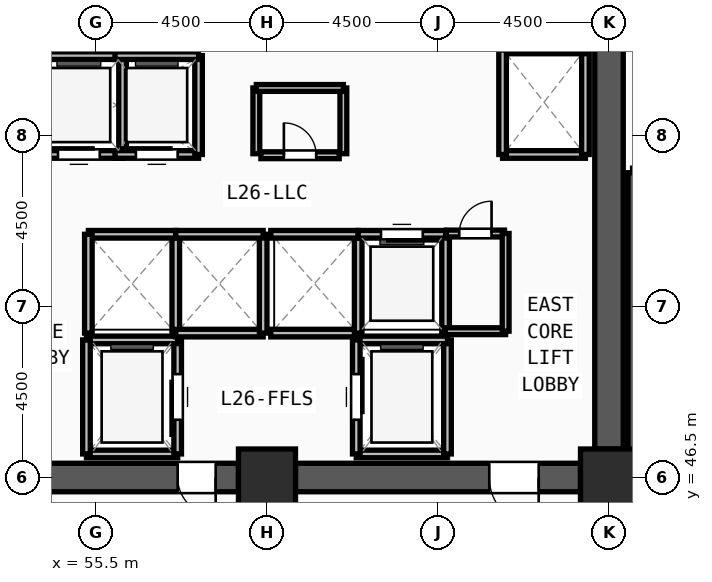
"""IFC4 building model, lengths in metres.
Left out: names, types, materials, properties, quantities, classifications, styles, units other than length and angle.
Written with IfcOpenShell. Run it as: python <this file> out.ifc"""

import sys

from ifc_helpers import new_model, si_unit, direction, frame, frame_2d, origin, origin_2d, place, context, subcontext, project, spatial, rectangle, extrude, source, transform, mapped, element, fill, save


model = new_model("IFC4")
c1 = context("Model", 3, precision=1e-05, world=origin(), true_north=direction((0.0, 1.0)))
c2 = subcontext(c1, "Body", "Model", "MODEL_VIEW")
j1 = project(units=[si_unit("LENGTHUNIT", "METRE"), si_unit("PLANEANGLEUNIT", "RADIAN")], contexts=[c1])
p1 = place(None, origin())
s1 = spatial("IfcSite", under=j1, at=p1, CompositionType="ELEMENT")
p2 = place(p1, origin())
s2 = spatial("IfcBuilding", under=s1, at=p2, CompositionType="ELEMENT")
p3 = place(p2, frame((0.0, 0.0, 102.0)))
s3 = spatial("IfcBuildingStorey", under=s2, at=p3, CompositionType="ELEMENT", Elevation=102.0)
m1 = source(origin(), c2, "Body", "SweptSolid", [
    extrude(rectangle(XDim=1.5, YDim=1.5, at=origin_2d()), origin(), (0.0, 0.0, 1.0), 3.75),
])
for number, where, z_axis, x_axis in (
    (1, (60.0, 46.5, 0.0), (0.0, 0.0, 1.0), (1.0, 0.0, 0.0)),
    (2, (69.0, 46.5, 0.0), (0.0, 0.0, 1.0), (1.0, 0.0, 0.0)),
):
    element("IfcColumn", number, at=place(p3, frame(where, z_axis=z_axis, x_axis=x_axis)), inside=s3, PredefinedType="COLUMN", context=c2, shape_type="MappedRepresentation", body=[
        mapped(m1, transform((0.0, 0.0, 0.0), x_axis=(1.0, 0.0, 0.0), y_axis=(0.0, 1.0, 0.0), z_axis=(0.0, 0.0, 1.0), scale=1.0)),
    ])
p4 = place(p3, frame((69.0, 60.75, 0.0), z_axis=(0.0, 0.0, 1.0), x_axis=(0.0, -1.0, 0.0)))
e3 = element("IfcWall", 3, at=p4, inside=s3, PredefinedType="SHEAR", context=c2, shape_type="SweptSolid", body=[
    extrude(rectangle(XDim=13.5, YDim=0.75, at=frame_2d((6.75, 0.0))), origin(), (0.0, 0.0, 1.0), 3.57),
])
m2 = source(origin(), c2, "Body", "SweptSolid", [
    extrude(rectangle(XDim=1.2, YDim=2.2, at=frame_2d((0.6, 1.1))), frame((0.0, 0.385, 0.0), z_axis=(0.0, -1.0, 0.0), x_axis=(1.0, 0.0, 0.0)), (0.0, 0.0, 1.0), 0.77),
])
p5 = place(p4, frame((1.2, 0.0, 0.0)))
e4 = element("IfcOpeningElement", 4, at=p5, cuts=e3, PredefinedType="OPENING", context=c2, shape_type="MappedRepresentation", body=[
    mapped(m2, transform((0.0, 0.0, 0.0), x_axis=(1.0, 0.0, 0.0), y_axis=(0.0, 1.0, 0.0), z_axis=(0.0, 0.0, 1.0), scale=1.0)),
])
p6 = place(p3, frame((68.25, 46.5, 0.0), z_axis=(0.0, 0.0, 1.0), x_axis=(-1.0, 0.0, 0.0)))
e5 = element("IfcWall", 5, at=p6, inside=s3, PredefinedType="SHEAR", context=c2, shape_type="SweptSolid", body=[
    extrude(rectangle(XDim=7.5, YDim=0.75, at=frame_2d((3.75, 0.0))), origin(), (0.0, 0.0, 1.0), 3.57),
])
m3 = source(origin(), c2, "Body", "SweptSolid", [
    extrude(rectangle(XDim=1.3, YDim=2.2, at=frame_2d((0.65, 1.1))), frame((0.0, 0.385, 0.0), z_axis=(0.0, -1.0, 0.0), x_axis=(1.0, 0.0, 0.0)), (0.0, 0.0, 1.0), 0.77),
])
p7 = place(p6, frame((1.1, 0.0, 0.0)))
e6 = element("IfcOpeningElement", 6, at=p7, cuts=e5, PredefinedType="OPENING", context=c2, shape_type="MappedRepresentation", body=[
    mapped(m3, transform((0.0, 0.0, 0.0), x_axis=(1.0, 0.0, 0.0), y_axis=(0.0, 1.0, 0.0), z_axis=(0.0, 0.0, 1.0), scale=1.0)),
])
p8 = place(p3, frame((59.25, 46.5, 0.0), z_axis=(0.0, 0.0, 1.0), x_axis=(-1.0, 0.0, 0.0)))
e7 = element("IfcWall", 7, at=p8, inside=s3, PredefinedType="SHEAR", context=c2, shape_type="SweptSolid", body=[
    extrude(rectangle(XDim=7.5, YDim=0.75, at=frame_2d((3.75, 0.0))), origin(), (0.0, 0.0, 1.0), 3.57),
])
p9 = place(p8, frame((5.1, 0.0, 0.0)))
e8 = element("IfcOpeningElement", 8, at=p9, cuts=e7, PredefinedType="OPENING", context=c2, shape_type="MappedRepresentation", body=[
    mapped(m3, transform((0.0, 0.0, 0.0), x_axis=(1.0, 0.0, 0.0), y_axis=(0.0, 1.0, 0.0), z_axis=(0.0, 0.0, 1.0), scale=1.0)),
])
m4 = source(origin(), c2, "Body", "SweptSolid", [
    extrude(rectangle(XDim=1.0, YDim=2.2, at=frame_2d((0.5, 1.1))), frame((0.0, 0.385, 0.0), z_axis=(0.0, -1.0, 0.0), x_axis=(1.0, 0.0, 0.0)), (0.0, 0.0, 1.0), 0.77),
])
p10 = place(p8, frame((0.6, 0.0, 0.0)))
e9 = element("IfcOpeningElement", 9, at=p10, cuts=e7, PredefinedType="OPENING", context=c2, shape_type="MappedRepresentation", body=[
    mapped(m4, transform((0.0, 0.0, 0.0), x_axis=(1.0, 0.0, 0.0), y_axis=(0.0, 1.0, 0.0), z_axis=(0.0, 0.0, 1.0), scale=1.0)),
])
p11 = place(p3, frame((69.62, 54.52, 0.0), z_axis=(0.0, 0.0, 1.0), x_axis=(0.0, -1.0, 0.0)))
e10 = element("IfcWall", 10, at=p11, inside=s3, PredefinedType="SOLIDWALL", context=c2, shape_type="SweptSolid", body=[
    extrude(rectangle(XDim=7.82, YDim=0.24, at=frame_2d((3.91, 0.0))), origin(), (0.0, 0.0, 1.0), 3.57),
])
p12 = place(p3, frame((55.25, 47.12, 0.0), z_axis=(0.0, 0.0, 1.0), x_axis=(1.0, 0.0, 0.0)))
e11 = element("IfcWall", 11, at=p12, inside=s3, PredefinedType="SOLIDWALL", context=c2, shape_type="SweptSolid", body=[
    extrude(rectangle(XDim=2.4, YDim=0.2, at=frame_2d((1.2, 0.0))), origin(), (0.0, 0.0, 1.0), 3.57),
])
p13 = place(p3, frame((57.65, 47.12, 0.0), z_axis=(0.0, 0.0, 1.0), x_axis=(0.0, 1.0, 0.0)))
e12 = element("IfcWall", 12, at=p13, inside=s3, PredefinedType="SOLIDWALL", context=c2, shape_type="SweptSolid", body=[
    extrude(rectangle(XDim=3.0, YDim=0.2, at=frame_2d((1.5, 0.0))), origin(), (0.0, 0.0, 1.0), 3.57),
])
m5 = source(origin(), c2, "Body", "SweptSolid", [
    extrude(rectangle(XDim=1.2, YDim=2.3, at=frame_2d((0.6, 1.15))), frame((0.0, 0.11, 0.0), z_axis=(0.0, -1.0, 0.0), x_axis=(1.0, 0.0, 0.0)), (0.0, 0.0, 1.0), 0.22),
])
p14 = place(p13, frame((0.9, 0.0, 0.0)))
e13 = element("IfcOpeningElement", 13, at=p14, cuts=e12, PredefinedType="OPENING", context=c2, shape_type="MappedRepresentation", body=[
    mapped(m5, transform((0.0, 0.0, 0.0), x_axis=(1.0, 0.0, 0.0), y_axis=(0.0, 1.0, 0.0), z_axis=(0.0, 0.0, 1.0), scale=1.0)),
])
p15 = place(p3, frame((57.65, 50.12, 0.0), z_axis=(0.0, 0.0, 1.0), x_axis=(-1.0, 0.0, 0.0)))
e14 = element("IfcWall", 14, at=p15, inside=s3, PredefinedType="SOLIDWALL", context=c2, shape_type="SweptSolid", body=[
    extrude(rectangle(XDim=2.4, YDim=0.2, at=frame_2d((1.2, 0.0))), origin(), (0.0, 0.0, 1.0), 3.57),
])
p16 = place(p3, frame((55.25, 50.12, 0.0), z_axis=(0.0, 0.0, 1.0), x_axis=(0.0, -1.0, 0.0)))
e15 = element("IfcWall", 15, at=p16, inside=s3, PredefinedType="SOLIDWALL", context=c2, shape_type="SweptSolid", body=[
    extrude(rectangle(XDim=3.0, YDim=0.2, at=frame_2d((1.5, 0.0))), origin(), (0.0, 0.0, 1.0), 3.57),
])
p17 = place(p3, frame((62.35, 47.12, 0.0), z_axis=(0.0, 0.0, 1.0), x_axis=(1.0, 0.0, 0.0)))
e16 = element("IfcWall", 16, at=p17, inside=s3, PredefinedType="SOLIDWALL", context=c2, shape_type="SweptSolid", body=[
    extrude(rectangle(XDim=2.4, YDim=0.2, at=frame_2d((1.2, 0.0))), origin(), (0.0, 0.0, 1.0), 3.57),
])
p18 = place(p3, frame((64.75, 47.12, 0.0), z_axis=(0.0, 0.0, 1.0), x_axis=(0.0, 1.0, 0.0)))
e17 = element("IfcWall", 17, at=p18, inside=s3, PredefinedType="SOLIDWALL", context=c2, shape_type="SweptSolid", body=[
    extrude(rectangle(XDim=3.0, YDim=0.2, at=frame_2d((1.5, 0.0))), origin(), (0.0, 0.0, 1.0), 3.57),
])
p19 = place(p3, frame((64.75, 50.12, 0.0), z_axis=(0.0, 0.0, 1.0), x_axis=(-1.0, 0.0, 0.0)))
e18 = element("IfcWall", 18, at=p19, inside=s3, PredefinedType="SOLIDWALL", context=c2, shape_type="SweptSolid", body=[
    extrude(rectangle(XDim=2.4, YDim=0.2, at=frame_2d((1.2, 0.0))), origin(), (0.0, 0.0, 1.0), 3.57),
])
p20 = place(p3, frame((62.35, 50.12, 0.0), z_axis=(0.0, 0.0, 1.0), x_axis=(0.0, -1.0, 0.0)))
e19 = element("IfcWall", 19, at=p20, inside=s3, PredefinedType="SOLIDWALL", context=c2, shape_type="SweptSolid", body=[
    extrude(rectangle(XDim=3.0, YDim=0.2, at=frame_2d((1.5, 0.0))), origin(), (0.0, 0.0, 1.0), 3.57),
])
p21 = place(p20, frame((0.9, 0.0, 0.0)))
e20 = element("IfcOpeningElement", 20, at=p21, cuts=e19, PredefinedType="OPENING", context=c2, shape_type="MappedRepresentation", body=[
    mapped(m5, transform((0.0, 0.0, 0.0), x_axis=(1.0, 0.0, 0.0), y_axis=(0.0, 1.0, 0.0), z_axis=(0.0, 0.0, 1.0), scale=1.0)),
])
p22 = place(p3, frame((66.2, 55.0, 0.0), z_axis=(0.0, 0.0, 1.0), x_axis=(1.0, 0.0, 0.0)))
e21 = element("IfcWall", 21, at=p22, inside=s3, PredefinedType="SOLIDWALL", context=c2, shape_type="SweptSolid", body=[
    extrude(rectangle(XDim=2.18, YDim=0.2, at=frame_2d((1.09, 0.0))), origin(), (0.0, 0.0, 1.0), 3.57),
])
p23 = place(p3, frame((68.38, 55.0, 0.0), z_axis=(0.0, 0.0, 1.0), x_axis=(0.0, 1.0, 0.0)))
e22 = element("IfcWall", 22, at=p23, inside=s3, PredefinedType="SOLIDWALL", context=c2, shape_type="SweptSolid", body=[
    extrude(rectangle(XDim=2.75, YDim=0.2, at=frame_2d((1.375, 0.0))), origin(), (0.0, 0.0, 1.0), 3.57),
])
p24 = place(p3, frame((68.38, 57.75, 0.0), z_axis=(0.0, 0.0, 1.0), x_axis=(-1.0, 0.0, 0.0)))
e23 = element("IfcWall", 23, at=p24, inside=s3, PredefinedType="SOLIDWALL", context=c2, shape_type="SweptSolid", body=[
    extrude(rectangle(XDim=2.18, YDim=0.2, at=frame_2d((1.09, 0.0))), origin(), (0.0, 0.0, 1.0), 3.57),
])
p25 = place(p3, frame((66.2, 57.75, 0.0), z_axis=(0.0, 0.0, 1.0), x_axis=(0.0, -1.0, 0.0)))
e24 = element("IfcWall", 24, at=p25, inside=s3, PredefinedType="SOLIDWALL", context=c2, shape_type="SweptSolid", body=[
    extrude(rectangle(XDim=2.75, YDim=0.2, at=frame_2d((1.375, 0.0))), origin(), (0.0, 0.0, 1.0), 3.57),
])
p26 = place(p3, frame((57.6, 50.3, 0.0), z_axis=(0.0, 0.0, 1.0), x_axis=(0.0, 1.0, 0.0)))
e25 = element("IfcWall", 25, at=p26, inside=s3, PredefinedType="SOLIDWALL", context=c2, shape_type="SweptSolid", body=[
    extrude(rectangle(XDim=2.6, YDim=0.2, at=frame_2d((1.3, 0.0))), origin(), (0.0, 0.0, 1.0), 3.57),
])
p27 = place(p3, frame((57.6, 52.9, 0.0), z_axis=(0.0, 0.0, 1.0), x_axis=(-1.0, 0.0, 0.0)))
e26 = element("IfcWall", 26, at=p27, inside=s3, PredefinedType="SOLIDWALL", context=c2, shape_type="SweptSolid", body=[
    extrude(rectangle(XDim=2.3, YDim=0.2, at=frame_2d((1.15, 0.0))), origin(), (0.0, 0.0, 1.0), 3.57),
])
p28 = place(p3, frame((55.3, 52.9, 0.0), z_axis=(0.0, 0.0, 1.0), x_axis=(0.0, -1.0, 0.0)))
e27 = element("IfcWall", 27, at=p28, inside=s3, PredefinedType="SOLIDWALL", context=c2, shape_type="SweptSolid", body=[
    extrude(rectangle(XDim=2.6, YDim=0.2, at=frame_2d((1.3, 0.0))), origin(), (0.0, 0.0, 1.0), 3.57),
])
p29 = place(p3, frame((57.6, 50.3, 0.0), z_axis=(0.0, 0.0, 1.0), x_axis=(1.0, 0.0, 0.0)))
e28 = element("IfcWall", 28, at=p29, inside=s3, PredefinedType="SOLIDWALL", context=c2, shape_type="SweptSolid", body=[
    extrude(rectangle(XDim=2.3, YDim=0.2, at=frame_2d((1.15, 0.0))), origin(), (0.0, 0.0, 1.0), 3.57),
])
p30 = place(p3, frame((59.9, 50.3, 0.0), z_axis=(0.0, 0.0, 1.0), x_axis=(0.0, 1.0, 0.0)))
e29 = element("IfcWall", 29, at=p30, inside=s3, PredefinedType="SOLIDWALL", context=c2, shape_type="SweptSolid", body=[
    extrude(rectangle(XDim=2.6, YDim=0.2, at=frame_2d((1.3, 0.0))), origin(), (0.0, 0.0, 1.0), 3.57),
])
for number, where, z_axis, x_axis in (
    (30, (59.9, 52.9, 0.0), (0.0, 0.0, 1.0), (-1.0, 0.0, 0.0)),
    (31, (60.1, 50.3, 0.0), (0.0, 0.0, 1.0), (1.0, 0.0, 0.0)),
):
    element("IfcWall", number, at=place(p3, frame(where, z_axis=z_axis, x_axis=x_axis)), inside=s3, PredefinedType="SOLIDWALL", context=c2, shape_type="SweptSolid", body=[
        extrude(rectangle(XDim=2.3, YDim=0.2, at=frame_2d((1.15, 0.0))), origin(), (0.0, 0.0, 1.0), 3.57),
    ])
p31 = place(p3, frame((62.4, 50.3, 0.0), z_axis=(0.0, 0.0, 1.0), x_axis=(0.0, 1.0, 0.0)))
e32 = element("IfcWall", 32, at=p31, inside=s3, PredefinedType="SOLIDWALL", context=c2, shape_type="SweptSolid", body=[
    extrude(rectangle(XDim=2.6, YDim=0.2, at=frame_2d((1.3, 0.0))), origin(), (0.0, 0.0, 1.0), 3.57),
])
p32 = place(p3, frame((62.4, 52.9, 0.0), z_axis=(0.0, 0.0, 1.0), x_axis=(-1.0, 0.0, 0.0)))
e33 = element("IfcWall", 33, at=p32, inside=s3, PredefinedType="SOLIDWALL", context=c2, shape_type="SweptSolid", body=[
    extrude(rectangle(XDim=2.3, YDim=0.2, at=frame_2d((1.15, 0.0))), origin(), (0.0, 0.0, 1.0), 3.57),
])
p33 = place(p3, frame((64.7, 50.3, 0.0), z_axis=(0.0, 0.0, 1.0), x_axis=(0.0, 1.0, 0.0)))
e34 = element("IfcWall", 34, at=p33, inside=s3, PredefinedType="SOLIDWALL", context=c2, shape_type="SweptSolid", body=[
    extrude(rectangle(XDim=2.6, YDim=0.2, at=frame_2d((1.3, 0.0))), origin(), (0.0, 0.0, 1.0), 3.57),
])
p34 = place(p3, frame((64.7, 52.9, 0.0), z_axis=(0.0, 0.0, 1.0), x_axis=(-1.0, 0.0, 0.0)))
e35 = element("IfcWall", 35, at=p34, inside=s3, PredefinedType="SOLIDWALL", context=c2, shape_type="SweptSolid", body=[
    extrude(rectangle(XDim=2.3, YDim=0.2, at=frame_2d((1.15, 0.0))), origin(), (0.0, 0.0, 1.0), 3.57),
])
m6 = source(origin(), c2, "Body", "SweptSolid", [
    extrude(rectangle(XDim=1.1, YDim=2.2, at=frame_2d((0.55, 1.1))), frame((0.0, 0.11, 0.0), z_axis=(0.0, -1.0, 0.0), x_axis=(1.0, 0.0, 0.0)), (0.0, 0.0, 1.0), 0.22),
])
p35 = place(p34, frame((0.6, 0.0, 0.0)))
e36 = element("IfcOpeningElement", 36, at=p35, cuts=e35, PredefinedType="OPENING", context=c2, shape_type="MappedRepresentation", body=[
    mapped(m6, transform((0.0, 0.0, 0.0), x_axis=(1.0, 0.0, 0.0), y_axis=(0.0, 1.0, 0.0), z_axis=(0.0, 0.0, 1.0), scale=1.0)),
])
p36 = place(p3, frame((53.9, 55.0, 0.0), z_axis=(0.0, 0.0, 1.0), x_axis=(1.0, 0.0, 0.0)))
e37 = element("IfcWall", 37, at=p36, inside=s3, PredefinedType="SOLIDWALL", context=c2, shape_type="SweptSolid", body=[
    extrude(rectangle(XDim=2.3, YDim=0.2, at=frame_2d((1.15, 0.0))), origin(), (0.0, 0.0, 1.0), 3.57),
])
p37 = place(p36, frame((0.6, 0.0, 0.0)))
e38 = element("IfcOpeningElement", 38, at=p37, cuts=e37, PredefinedType="OPENING", context=c2, shape_type="MappedRepresentation", body=[
    mapped(m6, transform((0.0, 0.0, 0.0), x_axis=(1.0, 0.0, 0.0), y_axis=(0.0, 1.0, 0.0), z_axis=(0.0, 0.0, 1.0), scale=1.0)),
])
p38 = place(p3, frame((56.2, 55.0, 0.0), z_axis=(0.0, 0.0, 1.0), x_axis=(0.0, 1.0, 0.0)))
e39 = element("IfcWall", 39, at=p38, inside=s3, PredefinedType="SOLIDWALL", context=c2, shape_type="SweptSolid", body=[
    extrude(rectangle(XDim=2.6, YDim=0.2, at=frame_2d((1.3, 0.0))), origin(), (0.0, 0.0, 1.0), 3.57),
])
p39 = place(p3, frame((56.2, 57.6, 0.0), z_axis=(0.0, 0.0, 1.0), x_axis=(-1.0, 0.0, 0.0)))
e40 = element("IfcWall", 40, at=p39, inside=s3, PredefinedType="SOLIDWALL", context=c2, shape_type="SweptSolid", body=[
    extrude(rectangle(XDim=2.3, YDim=0.2, at=frame_2d((1.15, 0.0))), origin(), (0.0, 0.0, 1.0), 3.57),
])
p40 = place(p3, frame((56.0, 55.0, 0.0), z_axis=(0.0, 0.0, 1.0), x_axis=(1.0, 0.0, 0.0)))
e41 = element("IfcWall", 41, at=p40, inside=s3, PredefinedType="SOLIDWALL", context=c2, shape_type="SweptSolid", body=[
    extrude(rectangle(XDim=2.2, YDim=0.2, at=frame_2d((1.1, 0.0))), origin(), (0.0, 0.0, 1.0), 3.57),
])
p41 = place(p40, frame((0.55, 0.0, 0.0)))
e42 = element("IfcOpeningElement", 42, at=p41, cuts=e41, PredefinedType="OPENING", context=c2, shape_type="MappedRepresentation", body=[
    mapped(m6, transform((0.0, 0.0, 0.0), x_axis=(1.0, 0.0, 0.0), y_axis=(0.0, 1.0, 0.0), z_axis=(0.0, 0.0, 1.0), scale=1.0)),
])
p42 = place(p3, frame((58.2, 55.0, 0.0), z_axis=(0.0, 0.0, 1.0), x_axis=(0.0, 1.0, 0.0)))
e43 = element("IfcWall", 43, at=p42, inside=s3, PredefinedType="SOLIDWALL", context=c2, shape_type="SweptSolid", body=[
    extrude(rectangle(XDim=2.6, YDim=0.2, at=frame_2d((1.3, 0.0))), origin(), (0.0, 0.0, 1.0), 3.57),
])
p43 = place(p3, frame((58.2, 57.6, 0.0), z_axis=(0.0, 0.0, 1.0), x_axis=(-1.0, 0.0, 0.0)))
e44 = element("IfcWall", 44, at=p43, inside=s3, PredefinedType="SOLIDWALL", context=c2, shape_type="SweptSolid", body=[
    extrude(rectangle(XDim=2.2, YDim=0.2, at=frame_2d((1.1, 0.0))), origin(), (0.0, 0.0, 1.0), 3.57),
])
p44 = place(p3, frame((59.84, 54.98, 0.0), z_axis=(0.0, 0.0, 1.0), x_axis=(1.0, 0.0, 0.0)))
e45 = element("IfcWall", 45, at=p44, inside=s3, PredefinedType="PARTITIONING", context=c2, shape_type="SweptSolid", body=[
    extrude(rectangle(XDim=2.06, YDim=0.18, at=frame_2d((1.03, 0.0))), origin(), (0.0, 0.0, 1.0), 3.57),
])
m7 = source(origin(), c2, "Body", "SweptSolid", [
    extrude(rectangle(XDim=0.85, YDim=2.1, at=frame_2d((0.425, 1.05))), frame((0.0, 0.1, 0.0), z_axis=(0.0, -1.0, 0.0), x_axis=(1.0, 0.0, 0.0)), (0.0, 0.0, 1.0), 0.2),
])
p45 = place(p44, frame((0.605, 0.0, 0.0)))
e46 = element("IfcOpeningElement", 46, at=p45, cuts=e45, PredefinedType="OPENING", context=c2, shape_type="MappedRepresentation", body=[
    mapped(m7, transform((0.0, 0.0, 0.0), x_axis=(1.0, 0.0, 0.0), y_axis=(0.0, 1.0, 0.0), z_axis=(0.0, 0.0, 1.0), scale=1.0)),
])
p46 = place(p3, frame((64.72, 52.92, 0.0), z_axis=(0.0, 0.0, 1.0), x_axis=(1.0, 0.0, 0.0)))
e47 = element("IfcWall", 47, at=p46, inside=s3, PredefinedType="PARTITIONING", context=c2, shape_type="SweptSolid", body=[
    extrude(rectangle(XDim=1.53, YDim=0.18, at=frame_2d((0.765, 0.0))), origin(), (0.0, 0.0, 1.0), 3.57),
])
p47 = place(p46, frame((0.34, 0.0, 0.0)))
e48 = element("IfcOpeningElement", 48, at=p47, cuts=e47, PredefinedType="OPENING", context=c2, shape_type="MappedRepresentation", body=[
    mapped(m7, transform((0.0, 0.0, 0.0), x_axis=(1.0, 0.0, 0.0), y_axis=(0.0, 1.0, 0.0), z_axis=(0.0, 0.0, 1.0), scale=1.0)),
])
for number, where, z_axis, x_axis in (
    (49, (59.72, 55.02, 0.0), (0.0, 0.0, 1.0), (0.0, 1.0, 0.0)),
    (50, (62.01, 55.02, 0.0), (0.0, 0.0, 1.0), (0.0, 1.0, 0.0)),
):
    element("IfcWall", number, at=place(p3, frame(where, z_axis=z_axis, x_axis=x_axis)), inside=s3, PredefinedType="PARTITIONING", context=c2, shape_type="SweptSolid", body=[
        extrude(rectangle(XDim=1.73, YDim=0.18, at=frame_2d((0.865, 0.0))), origin(), (0.0, 0.0, 1.0), 3.57),
    ])
p48 = place(p3, frame((59.72, 56.75, 0.0), z_axis=(0.0, 0.0, 1.0), x_axis=(1.0, 0.0, 0.0)))
e51 = element("IfcWall", 51, at=p48, inside=s3, PredefinedType="PARTITIONING", context=c2, shape_type="SweptSolid", body=[
    extrude(rectangle(XDim=2.29, YDim=0.18, at=frame_2d((1.145, 0.0))), origin(), (0.0, 0.0, 1.0), 3.57),
])
p49 = place(p3, frame((64.69, 50.35, 0.0), z_axis=(0.0, 0.0, 1.0), x_axis=(1.0, 0.0, 0.0)))
e52 = element("IfcWall", 52, at=p49, inside=s3, PredefinedType="PARTITIONING", context=c2, shape_type="SweptSolid", body=[
    extrude(rectangle(XDim=1.59, YDim=0.18, at=frame_2d((0.795, 0.0))), origin(), (0.0, 0.0, 1.0), 3.57),
])
p50 = place(p3, frame((66.28, 50.35, 0.0), z_axis=(0.0, 0.0, 1.0), x_axis=(0.0, 1.0, 0.0)))
e53 = element("IfcWall", 53, at=p50, inside=s3, PredefinedType="PARTITIONING", context=c2, shape_type="SweptSolid", body=[
    extrude(rectangle(XDim=2.57, YDim=0.18, at=frame_2d((1.285, 0.0))), origin(), (0.0, 0.0, 1.0), 3.57),
])
m8 = source(origin(), c2, "Body", "SweptSolid", [
    extrude(rectangle(XDim=1.0, YDim=2.2, at=frame_2d((0.5, 1.1))), frame((0.0, 0.025, 0.0), z_axis=(0.0, -1.0, 0.0), x_axis=(1.0, 0.0, 0.0)), (0.0, 0.0, 1.0), 0.05),
])
p51 = place(p10, origin())
e54 = element("IfcDoor", 54, at=p51, inside=s3, OperationType="SINGLE_SWING_LEFT", PredefinedType="DOOR", context=c2, shape_type="MappedRepresentation", body=[
    mapped(m8, transform((0.0, 0.0, 0.0), x_axis=(1.0, 0.0, 0.0), y_axis=(0.0, 1.0, 0.0), z_axis=(0.0, 0.0, 1.0), scale=1.0)),
])
fill(e9, e54)
m9 = source(origin(), c2, "Body", "SweptSolid", [
    extrude(rectangle(XDim=1.3, YDim=2.2, at=frame_2d((0.65, 1.1))), frame((0.0, 0.025, 0.0), z_axis=(0.0, -1.0, 0.0), x_axis=(1.0, 0.0, 0.0)), (0.0, 0.0, 1.0), 0.05),
])
p52 = place(p7, origin())
e55 = element("IfcDoor", 55, at=p52, inside=s3, OperationType="SINGLE_SWING_LEFT", PredefinedType="DOOR", context=c2, shape_type="MappedRepresentation", body=[
    mapped(m9, transform((0.0, 0.0, 0.0), x_axis=(1.0, 0.0, 0.0), y_axis=(0.0, 1.0, 0.0), z_axis=(0.0, 0.0, 1.0), scale=1.0)),
])
fill(e6, e55)
m10 = source(origin(), c2, "Body", "SweptSolid", [
    extrude(rectangle(XDim=1.2, YDim=2.3, at=frame_2d((0.6, 1.15))), frame((0.0, 0.025, 0.0), z_axis=(0.0, -1.0, 0.0), x_axis=(1.0, 0.0, 0.0)), (0.0, 0.0, 1.0), 0.05),
])
p53 = place(p14, origin())
e56 = element("IfcDoor", 56, at=p53, inside=s3, OperationType="SLIDING_TO_LEFT", PredefinedType="DOOR", context=c2, shape_type="MappedRepresentation", body=[
    mapped(m10, transform((0.0, 0.0, 0.0), x_axis=(1.0, 0.0, 0.0), y_axis=(0.0, 1.0, 0.0), z_axis=(0.0, 0.0, 1.0), scale=1.0)),
])
fill(e13, e56)
p54 = place(p21, origin())
e57 = element("IfcDoor", 57, at=p54, inside=s3, OperationType="SLIDING_TO_LEFT", PredefinedType="DOOR", context=c2, shape_type="MappedRepresentation", body=[
    mapped(m10, transform((0.0, 0.0, 0.0), x_axis=(1.0, 0.0, 0.0), y_axis=(0.0, 1.0, 0.0), z_axis=(0.0, 0.0, 1.0), scale=1.0)),
])
fill(e20, e57)
m11 = source(origin(), c2, "Body", "SweptSolid", [
    extrude(rectangle(XDim=1.1, YDim=2.2, at=frame_2d((0.55, 1.1))), frame((0.0, 0.025, 0.0), z_axis=(0.0, -1.0, 0.0), x_axis=(1.0, 0.0, 0.0)), (0.0, 0.0, 1.0), 0.05),
])
p55 = place(p35, origin())
e58 = element("IfcDoor", 58, at=p55, inside=s3, OperationType="SLIDING_TO_LEFT", PredefinedType="DOOR", context=c2, shape_type="MappedRepresentation", body=[
    mapped(m11, transform((0.0, 0.0, 0.0), x_axis=(1.0, 0.0, 0.0), y_axis=(0.0, 1.0, 0.0), z_axis=(0.0, 0.0, 1.0), scale=1.0)),
])
fill(e36, e58)
p56 = place(p37, origin())
e59 = element("IfcDoor", 59, at=p56, inside=s3, OperationType="SLIDING_TO_LEFT", PredefinedType="DOOR", context=c2, shape_type="MappedRepresentation", body=[
    mapped(m11, transform((0.0, 0.0, 0.0), x_axis=(1.0, 0.0, 0.0), y_axis=(0.0, 1.0, 0.0), z_axis=(0.0, 0.0, 1.0), scale=1.0)),
])
fill(e38, e59)
p57 = place(p41, origin())
e60 = element("IfcDoor", 60, at=p57, inside=s3, OperationType="SLIDING_TO_LEFT", PredefinedType="DOOR", context=c2, shape_type="MappedRepresentation", body=[
    mapped(m11, transform((0.0, 0.0, 0.0), x_axis=(1.0, 0.0, 0.0), y_axis=(0.0, 1.0, 0.0), z_axis=(0.0, 0.0, 1.0), scale=1.0)),
])
fill(e42, e60)
m12 = source(origin(), c2, "Body", "SweptSolid", [
    extrude(rectangle(XDim=0.85, YDim=2.1, at=frame_2d((0.425, 1.05))), frame((0.0, 0.025, 0.0), z_axis=(0.0, -1.0, 0.0), x_axis=(1.0, 0.0, 0.0)), (0.0, 0.0, 1.0), 0.05),
])
p58 = place(p45, origin())
e61 = element("IfcDoor", 61, at=p58, inside=s3, OperationType="SINGLE_SWING_LEFT", PredefinedType="DOOR", context=c2, shape_type="MappedRepresentation", body=[
    mapped(m12, transform((0.0, 0.0, 0.0), x_axis=(1.0, 0.0, 0.0), y_axis=(0.0, 1.0, 0.0), z_axis=(0.0, 0.0, 1.0), scale=1.0)),
])
fill(e46, e61)
p59 = place(p47, origin())
e62 = element("IfcDoor", 62, at=p59, inside=s3, OperationType="SINGLE_SWING_RIGHT", PredefinedType="DOOR", context=c2, shape_type="MappedRepresentation", body=[
    mapped(m12, transform((0.0, 0.0, 0.0), x_axis=(1.0, 0.0, 0.0), y_axis=(0.0, 1.0, 0.0), z_axis=(0.0, 0.0, 1.0), scale=1.0)),
])
fill(e48, e62)
save(model, sys.argv[1])
